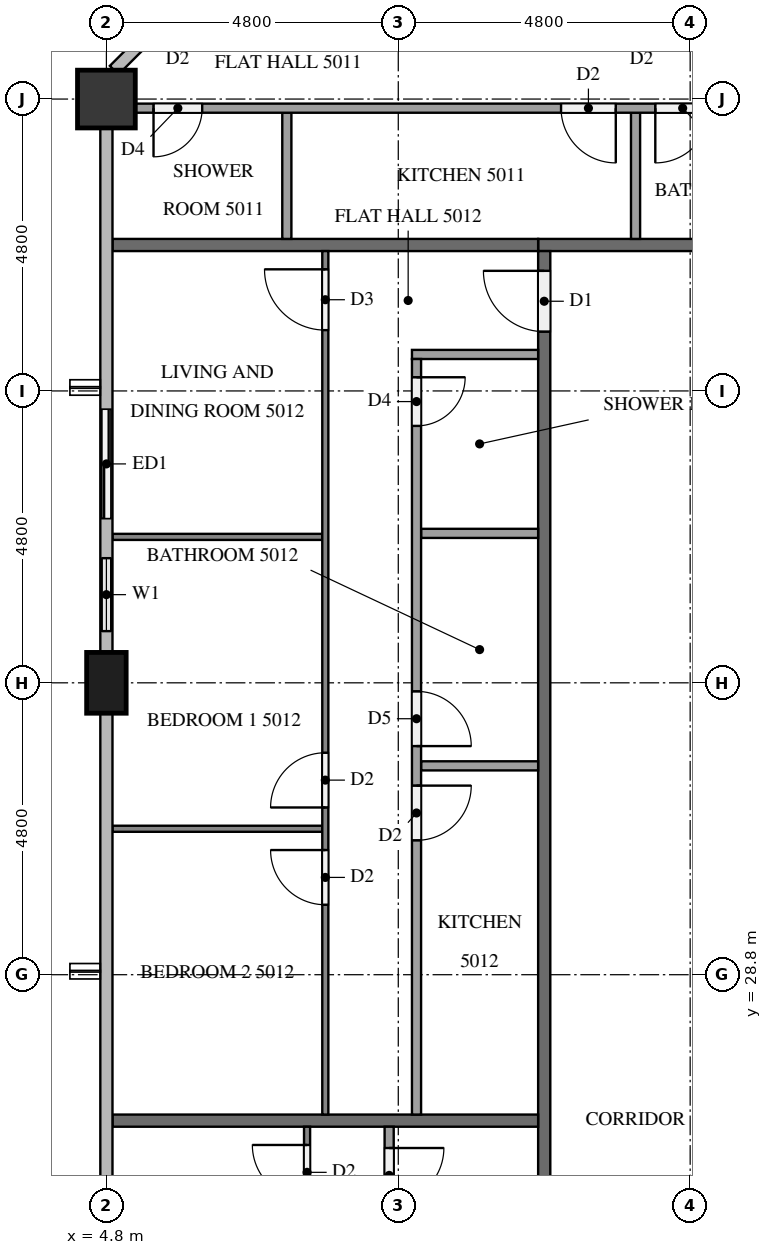
"""IFC4 building model, lengths in metres.
Left out: names, types, materials, properties, quantities, classifications, styles, units other than length and angle.
Written with IfcOpenShell. Run it as: python <this file> out.ifc"""

import sys

from ifc_helpers import new_model, si_unit, direction, frame, frame_2d, origin, origin_2d, place, context, subcontext, project, spatial, rectangle, extrude, element, fill, save


model = new_model("IFC4")
c1 = context("Model", 3, precision=1e-05, world=origin(), true_north=direction((0.0, 1.0)))
c2 = subcontext(c1, "Body", "Model", "MODEL_VIEW")
j1 = project(units=[si_unit("LENGTHUNIT", "METRE"), si_unit("PLANEANGLEUNIT", "RADIAN")], contexts=[c1])
p1 = place(None, origin())
s1 = spatial("IfcSite", under=j1, at=p1, CompositionType="ELEMENT")
p2 = place(p1, origin())
s2 = spatial("IfcBuilding", under=s1, at=p2, CompositionType="ELEMENT")
p3 = place(p2, frame((0.0, 0.0, 192.9)))
s3 = spatial("IfcBuildingStorey", under=s2, at=p3, CompositionType="ELEMENT", Elevation=192.9)
p4 = place(p3, frame((4.8, 43.2, 0.0), z_axis=(0.0, 0.0, 1.0), x_axis=(1.0, 0.0, 0.0)))
e1 = element("IfcColumn", 1, at=p4, inside=s3, PredefinedType="COLUMN", context=c2, shape_type="SweptSolid", body=[
    extrude(rectangle(XDim=0.95, YDim=0.95, at=origin_2d()), origin(), (0.0, 0.0, 1.0), 3.2),
])
p5 = place(p3, frame((4.8, 33.6, 0.0), z_axis=(0.0, 0.0, 1.0), x_axis=(0.0, 1.0, 0.0)))
e2 = element("IfcColumn", 2, at=p5, inside=s3, PredefinedType="COLUMN", context=c2, shape_type="SweptSolid", body=[
    extrude(rectangle(XDim=1.0, YDim=0.65, at=origin_2d()), origin(), (0.0, 0.0, 1.0), 3.2),
])
p6 = place(p3, frame((4.8, 38.4, 0.0), z_axis=(0.0, 0.0, 1.0), x_axis=(0.0, -1.0, 0.0)))
e3 = element("IfcWall", 3, at=p6, inside=s3, PredefinedType="SOLIDWALL", context=c2, shape_type="SweptSolid", body=[
    extrude(rectangle(XDim=4.3, YDim=0.15, at=frame_2d((2.15, 0.0))), origin(), (0.0, 0.0, 1.0), 3.2),
])
p7 = place(p6, frame((0.3, 0.0, 0.0)))
e4 = element("IfcOpeningElement", 4, at=p7, cuts=e3, PredefinedType="OPENING", context=c2, shape_type="SweptSolid", body=[
    extrude(rectangle(XDim=1.8, YDim=2.4, at=frame_2d((0.9, 1.2))), frame((0.0, 0.085, 0.0), z_axis=(0.0, -1.0, 0.0), x_axis=(1.0, 0.0, 0.0)), (0.0, 0.0, 1.0), 0.17),
])
p8 = place(p6, frame((2.75, 0.0, 0.9)))
e5 = element("IfcOpeningElement", 5, at=p8, cuts=e3, PredefinedType="OPENING", context=c2, shape_type="SweptSolid", body=[
    extrude(rectangle(XDim=1.2, YDim=1.4, at=frame_2d((0.6, 0.7))), frame((0.0, 0.085, 0.0), z_axis=(0.0, -1.0, 0.0), x_axis=(1.0, 0.0, 0.0)), (0.0, 0.0, 1.0), 0.17),
])
p9 = place(p3, frame((11.9, 40.8, 0.0), z_axis=(0.0, 0.0, 1.0), x_axis=(1.0, 0.0, 0.0)))
e6 = element("IfcWall", 6, at=p9, inside=s3, PredefinedType="PARTITIONING", context=c2, shape_type="SweptSolid", body=[
    extrude(rectangle(XDim=38.6, YDim=0.2, at=frame_2d((19.3, 0.0))), origin(), (0.0, 0.0, 1.0), 3.2),
])
p10 = place(p9, frame((34.125, 0.0, 0.0)))
e7 = element("IfcOpeningElement", 7, at=p10, cuts=e6, PredefinedType="OPENING", context=c2, shape_type="SweptSolid", body=[
    extrude(rectangle(XDim=1.0, YDim=2.1, at=frame_2d((0.5, 1.05))), frame((0.0, 0.11, 0.0), z_axis=(0.0, -1.0, 0.0), x_axis=(1.0, 0.0, 0.0)), (0.0, 0.0, 1.0), 0.22),
])
p11 = place(p9, frame((24.525, 0.0, 0.0)))
e8 = element("IfcOpeningElement", 8, at=p11, cuts=e6, PredefinedType="OPENING", context=c2, shape_type="SweptSolid", body=[
    extrude(rectangle(XDim=1.0, YDim=2.1, at=frame_2d((0.5, 1.05))), frame((0.0, 0.11, 0.0), z_axis=(0.0, -1.0, 0.0), x_axis=(1.0, 0.0, 0.0)), (0.0, 0.0, 1.0), 0.22),
])
p12 = place(p9, frame((7.725, 0.0, 0.0)))
e9 = element("IfcOpeningElement", 9, at=p12, cuts=e6, PredefinedType="OPENING", context=c2, shape_type="SweptSolid", body=[
    extrude(rectangle(XDim=1.0, YDim=2.1, at=frame_2d((0.5, 1.05))), frame((0.0, 0.11, 0.0), z_axis=(0.0, -1.0, 0.0), x_axis=(1.0, 0.0, 0.0)), (0.0, 0.0, 1.0), 0.22),
])
p13 = place(p9, frame((5.875, 0.0, 0.0)))
e10 = element("IfcOpeningElement", 10, at=p13, cuts=e6, PredefinedType="OPENING", context=c2, shape_type="SweptSolid", body=[
    extrude(rectangle(XDim=1.0, YDim=2.1, at=frame_2d((0.5, 1.05))), frame((0.0, 0.11, 0.0), z_axis=(0.0, -1.0, 0.0), x_axis=(1.0, 0.0, 0.0)), (0.0, 0.0, 1.0), 0.22),
])
p14 = place(p3, frame((12.0, 12.1, 0.0), z_axis=(0.0, 0.0, 1.0), x_axis=(0.0, 1.0, 0.0)))
e11 = element("IfcWall", 11, at=p14, inside=s3, PredefinedType="PARTITIONING", context=c2, shape_type="SweptSolid", body=[
    extrude(rectangle(XDim=28.6, YDim=0.2, at=frame_2d((14.3, 0.0))), origin(), (0.0, 0.0, 1.0), 3.2),
])
p15 = place(p14, frame((27.275, 0.0, 0.0)))
e12 = element("IfcOpeningElement", 12, at=p15, cuts=e11, PredefinedType="OPENING", context=c2, shape_type="SweptSolid", body=[
    extrude(rectangle(XDim=1.0, YDim=2.1, at=frame_2d((0.5, 1.05))), frame((0.0, 0.11, 0.0), z_axis=(0.0, -1.0, 0.0), x_axis=(1.0, 0.0, 0.0)), (0.0, 0.0, 1.0), 0.22),
])
p16 = place(p14, frame((0.325, 0.0, 0.0)))
e13 = element("IfcOpeningElement", 13, at=p16, cuts=e11, PredefinedType="OPENING", context=c2, shape_type="SweptSolid", body=[
    extrude(rectangle(XDim=1.0, YDim=2.1, at=frame_2d((0.5, 1.05))), frame((0.0, 0.11, 0.0), z_axis=(0.0, -1.0, 0.0), x_axis=(1.0, 0.0, 0.0)), (0.0, 0.0, 1.0), 0.22),
])
for number, where, z_axis, x_axis in (
    (14, (4.9, 40.8, 0.0), (0.0, 0.0, 1.0), (1.0, 0.0, 0.0)),
    (15, (4.9, 26.4, 0.0), (0.0, 0.0, 1.0), (1.0, 0.0, 0.0)),
):
    element("IfcWall", number, at=place(p3, frame(where, z_axis=z_axis, x_axis=x_axis)), inside=s3, PredefinedType="PARTITIONING", context=c2, shape_type="SweptSolid", body=[
        extrude(rectangle(XDim=7.0, YDim=0.2, at=frame_2d((3.5, 0.0))), origin(), (0.0, 0.0, 1.0), 3.2),
    ])
for number, where, z_axis, x_axis in (
    (16, (13.502, 40.9, 0.0), (0.0, 0.0, 1.0), (0.0, 1.0, 0.0)),
    (17, (7.767, 40.9, 0.0), (0.0, 0.0, 1.0), (0.0, 1.0, 0.0)),
):
    element("IfcWall", number, at=place(p3, frame(where, z_axis=z_axis, x_axis=x_axis)), inside=s3, PredefinedType="PARTITIONING", context=c2, shape_type="SweptSolid", body=[
        extrude(rectangle(XDim=2.075, YDim=0.15, at=frame_2d((1.038, 0.0))), origin(), (0.0, 0.0, 1.0), 3.2),
    ])
p17 = place(p3, frame((17.325, 43.05, 0.0), z_axis=(0.0, 0.0, 1.0), x_axis=(-1.0, 0.0, 0.0)))
e18 = element("IfcWall", 18, at=p17, inside=s3, PredefinedType="PARTITIONING", context=c2, shape_type="SweptSolid", body=[
    extrude(rectangle(XDim=12.05, YDim=0.15, at=frame_2d((6.025, 0.0))), origin(), (0.0, 0.0, 1.0), 3.2),
])
p18 = place(p17, frame((2.598, 0.0, 0.0)))
e19 = element("IfcOpeningElement", 19, at=p18, cuts=e18, PredefinedType="OPENING", context=c2, shape_type="SweptSolid", body=[
    extrude(rectangle(XDim=0.9, YDim=2.1, at=frame_2d((0.45, 1.05))), frame((0.0, 0.085, 0.0), z_axis=(0.0, -1.0, 0.0), x_axis=(1.0, 0.0, 0.0)), (0.0, 0.0, 1.0), 0.17),
])
p19 = place(p17, frame((4.148, 0.0, 0.0)))
e20 = element("IfcOpeningElement", 20, at=p19, cuts=e18, PredefinedType="OPENING", context=c2, shape_type="SweptSolid", body=[
    extrude(rectangle(XDim=0.9, YDim=2.1, at=frame_2d((0.45, 1.05))), frame((0.0, 0.085, 0.0), z_axis=(0.0, -1.0, 0.0), x_axis=(1.0, 0.0, 0.0)), (0.0, 0.0, 1.0), 0.17),
])
p20 = place(p17, frame((10.95, 0.0, 0.0)))
e21 = element("IfcOpeningElement", 21, at=p20, cuts=e18, PredefinedType="OPENING", context=c2, shape_type="SweptSolid", body=[
    extrude(rectangle(XDim=0.8, YDim=2.1, at=frame_2d((0.4, 1.05))), frame((0.0, 0.085, 0.0), z_axis=(0.0, -1.0, 0.0), x_axis=(1.0, 0.0, 0.0)), (0.0, 0.0, 1.0), 0.17),
])
for number, where, z_axis, x_axis in (
    (22, (8.35, 36.0, 0.0), (0.0, 0.0, 1.0), (-1.0, 0.0, 0.0)),
    (23, (8.35, 31.2, 0.0), (0.0, 0.0, 1.0), (-1.0, 0.0, 0.0)),
):
    element("IfcWall", number, at=place(p3, frame(where, z_axis=z_axis, x_axis=x_axis)), inside=s3, PredefinedType="PARTITIONING", context=c2, shape_type="SweptSolid", body=[
        extrude(rectangle(XDim=3.45, YDim=0.1, at=frame_2d((1.725, 0.0))), origin(), (0.0, 0.0, 1.0), 3.2),
    ])
p21 = place(p3, frame((8.4, 26.5, 0.0), z_axis=(0.0, 0.0, 1.0), x_axis=(0.0, 1.0, 0.0)))
e24 = element("IfcWall", 24, at=p21, inside=s3, PredefinedType="PARTITIONING", context=c2, shape_type="SweptSolid", body=[
    extrude(rectangle(XDim=14.2, YDim=0.1, at=frame_2d((7.1, 0.0))), origin(), (0.0, 0.0, 1.0), 3.2),
])
p22 = place(p21, frame((12.9, 0.0, 0.0)))
e25 = element("IfcOpeningElement", 25, at=p22, cuts=e24, PredefinedType="OPENING", context=c2, shape_type="SweptSolid", body=[
    extrude(rectangle(XDim=1.0, YDim=2.1, at=frame_2d((0.5, 1.05))), frame((0.0, 0.06, 0.0), z_axis=(0.0, -1.0, 0.0), x_axis=(1.0, 0.0, 0.0)), (0.0, 0.0, 1.0), 0.12),
])
p23 = place(p21, frame((5.05, 0.0, 0.0)))
e26 = element("IfcOpeningElement", 26, at=p23, cuts=e24, PredefinedType="OPENING", context=c2, shape_type="SweptSolid", body=[
    extrude(rectangle(XDim=0.9, YDim=2.1, at=frame_2d((0.45, 1.05))), frame((0.0, 0.06, 0.0), z_axis=(0.0, -1.0, 0.0), x_axis=(1.0, 0.0, 0.0)), (0.0, 0.0, 1.0), 0.12),
])
p24 = place(p21, frame((3.45, 0.0, 0.0)))
e27 = element("IfcOpeningElement", 27, at=p24, cuts=e24, PredefinedType="OPENING", context=c2, shape_type="SweptSolid", body=[
    extrude(rectangle(XDim=0.9, YDim=2.1, at=frame_2d((0.45, 1.05))), frame((0.0, 0.06, 0.0), z_axis=(0.0, -1.0, 0.0), x_axis=(1.0, 0.0, 0.0)), (0.0, 0.0, 1.0), 0.12),
])
for number, where, z_axis, x_axis in (
    (28, (11.9, 36.058, 0.0), (0.0, 0.0, 1.0), (-1.0, 0.0, 0.0)),
    (29, (11.9, 32.235, 0.0), (0.0, 0.0, 1.0), (-1.0, 0.0, 0.0)),
):
    element("IfcWall", number, at=place(p3, frame(where, z_axis=z_axis, x_axis=x_axis)), inside=s3, PredefinedType="PARTITIONING", context=c2, shape_type="SweptSolid", body=[
        extrude(rectangle(XDim=1.925, YDim=0.15, at=frame_2d((0.962, 0.0))), origin(), (0.0, 0.0, 1.0), 3.2),
    ])
p25 = place(p3, frame((11.9, 39.0, 0.0), z_axis=(0.0, 0.0, 1.0), x_axis=(-1.0, 0.0, 0.0)))
e30 = element("IfcWall", 30, at=p25, inside=s3, PredefinedType="PARTITIONING", context=c2, shape_type="SweptSolid", body=[
    extrude(rectangle(XDim=2.075, YDim=0.15, at=frame_2d((1.038, 0.0))), origin(), (0.0, 0.0, 1.0), 3.2),
])
p26 = place(p3, frame((9.9, 38.925, 0.0), z_axis=(0.0, 0.0, 1.0), x_axis=(0.0, -1.0, 0.0)))
e31 = element("IfcWall", 31, at=p26, inside=s3, PredefinedType="PARTITIONING", context=c2, shape_type="SweptSolid", body=[
    extrude(rectangle(XDim=12.425, YDim=0.15, at=frame_2d((6.212, 0.0))), origin(), (0.0, 0.0, 1.0), 3.2),
])
p27 = place(p26, frame((0.3, 0.0, 0.0)))
e32 = element("IfcOpeningElement", 32, at=p27, cuts=e31, PredefinedType="OPENING", context=c2, shape_type="SweptSolid", body=[
    extrude(rectangle(XDim=0.8, YDim=2.1, at=frame_2d((0.4, 1.05))), frame((0.0, 0.085, 0.0), z_axis=(0.0, -1.0, 0.0), x_axis=(1.0, 0.0, 0.0)), (0.0, 0.0, 1.0), 0.17),
])
p28 = place(p26, frame((5.465, 0.0, 0.0)))
e33 = element("IfcOpeningElement", 33, at=p28, cuts=e31, PredefinedType="OPENING", context=c2, shape_type="SweptSolid", body=[
    extrude(rectangle(XDim=0.9, YDim=2.1, at=frame_2d((0.45, 1.05))), frame((0.0, 0.085, 0.0), z_axis=(0.0, -1.0, 0.0), x_axis=(1.0, 0.0, 0.0)), (0.0, 0.0, 1.0), 0.17),
])
p29 = place(p26, frame((7.015, 0.0, 0.0)))
e34 = element("IfcOpeningElement", 34, at=p29, cuts=e31, PredefinedType="OPENING", context=c2, shape_type="SweptSolid", body=[
    extrude(rectangle(XDim=0.9, YDim=2.1, at=frame_2d((0.45, 1.05))), frame((0.0, 0.085, 0.0), z_axis=(0.0, -1.0, 0.0), x_axis=(1.0, 0.0, 0.0)), (0.0, 0.0, 1.0), 0.17),
])
p30 = place(p3, frame((8.1, 12.1, 0.0), z_axis=(0.0, 0.0, 1.0), x_axis=(0.0, 1.0, 0.0)))
e35 = element("IfcWall", 35, at=p30, inside=s3, PredefinedType="PARTITIONING", context=c2, shape_type="SweptSolid", body=[
    extrude(rectangle(XDim=14.2, YDim=0.1, at=frame_2d((7.1, 0.0))), origin(), (0.0, 0.0, 1.0), 3.2),
])
p31 = place(p30, frame((3.45, 0.0, 0.0)))
e36 = element("IfcOpeningElement", 36, at=p31, cuts=e35, PredefinedType="OPENING", context=c2, shape_type="SweptSolid", body=[
    extrude(rectangle(XDim=0.9, YDim=2.1, at=frame_2d((0.45, 1.05))), frame((0.0, 0.06, 0.0), z_axis=(0.0, -1.0, 0.0), x_axis=(1.0, 0.0, 0.0)), (0.0, 0.0, 1.0), 0.12),
])
p32 = place(p30, frame((5.05, 0.0, 0.0)))
e37 = element("IfcOpeningElement", 37, at=p32, cuts=e35, PredefinedType="OPENING", context=c2, shape_type="SweptSolid", body=[
    extrude(rectangle(XDim=1.0, YDim=2.1, at=frame_2d((0.5, 1.05))), frame((0.0, 0.06, 0.0), z_axis=(0.0, -1.0, 0.0), x_axis=(1.0, 0.0, 0.0)), (0.0, 0.0, 1.0), 0.12),
])
p33 = place(p30, frame((13.0, 0.0, 0.0)))
e38 = element("IfcOpeningElement", 38, at=p33, cuts=e35, PredefinedType="OPENING", context=c2, shape_type="SweptSolid", body=[
    extrude(rectangle(XDim=0.9, YDim=2.1, at=frame_2d((0.45, 1.05))), frame((0.0, 0.06, 0.0), z_axis=(0.0, -1.0, 0.0), x_axis=(1.0, 0.0, 0.0)), (0.0, 0.0, 1.0), 0.12),
])
p34 = place(p3, frame((9.45, 26.3, 0.0), z_axis=(0.0, 0.0, 1.0), x_axis=(0.0, -1.0, 0.0)))
e39 = element("IfcWall", 39, at=p34, inside=s3, PredefinedType="PARTITIONING", context=c2, shape_type="SweptSolid", body=[
    extrude(rectangle(XDim=12.425, YDim=0.15, at=frame_2d((6.212, 0.0))), origin(), (0.0, 0.0, 1.0), 3.2),
])
p35 = place(p34, frame((9.883, 0.0, 0.0)))
e40 = element("IfcOpeningElement", 40, at=p35, cuts=e39, PredefinedType="OPENING", context=c2, shape_type="SweptSolid", body=[
    extrude(rectangle(XDim=0.8, YDim=2.1, at=frame_2d((0.4, 1.05))), frame((0.0, 0.085, 0.0), z_axis=(0.0, -1.0, 0.0), x_axis=(1.0, 0.0, 0.0)), (0.0, 0.0, 1.0), 0.17),
])
p36 = place(p34, frame((8.333, 0.0, 0.0)))
e41 = element("IfcOpeningElement", 41, at=p36, cuts=e39, PredefinedType="OPENING", context=c2, shape_type="SweptSolid", body=[
    extrude(rectangle(XDim=0.9, YDim=2.1, at=frame_2d((0.45, 1.05))), frame((0.0, 0.085, 0.0), z_axis=(0.0, -1.0, 0.0), x_axis=(1.0, 0.0, 0.0)), (0.0, 0.0, 1.0), 0.17),
])
p37 = place(p34, frame((0.35, 0.0, 0.0)))
e42 = element("IfcOpeningElement", 42, at=p37, cuts=e39, PredefinedType="OPENING", context=c2, shape_type="SweptSolid", body=[
    extrude(rectangle(XDim=0.9, YDim=2.1, at=frame_2d((0.45, 1.05))), frame((0.0, 0.085, 0.0), z_axis=(0.0, -1.0, 0.0), x_axis=(1.0, 0.0, 0.0)), (0.0, 0.0, 1.0), 0.17),
])
p38 = place(p7, origin())
e43 = element("IfcDoor", 43, at=p38, inside=s3, OperationType="SLIDING_TO_RIGHT", PredefinedType="DOOR", context=c2, shape_type="SweptSolid", body=[
    extrude(rectangle(XDim=1.8, YDim=2.4, at=frame_2d((0.9, 1.2))), frame((0.0, 0.025, 0.0), z_axis=(0.0, -1.0, 0.0), x_axis=(1.0, 0.0, 0.0)), (0.0, 0.0, 1.0), 0.05),
])
fill(e4, e43)
p39 = place(p8, origin())
e44 = element("IfcWindow", 44, at=p39, inside=s3, PartitioningType="SINGLE_PANEL", PredefinedType="WINDOW", context=c2, shape_type="SweptSolid", body=[
    extrude(rectangle(XDim=1.2, YDim=1.4, at=frame_2d((0.6, 0.7))), frame((0.0, 0.03, 0.0), z_axis=(0.0, -1.0, 0.0), x_axis=(1.0, 0.0, 0.0)), (0.0, 0.0, 1.0), 0.06),
])
fill(e5, e44)
p40 = place(p15, origin())
e45 = element("IfcDoor", 45, at=p40, inside=s3, OperationType="SINGLE_SWING_RIGHT", PredefinedType="DOOR", context=c2, shape_type="SweptSolid", body=[
    extrude(rectangle(XDim=1.0, YDim=2.1, at=frame_2d((0.5, 1.05))), frame((0.0, 0.025, 0.0), z_axis=(0.0, -1.0, 0.0), x_axis=(1.0, 0.0, 0.0)), (0.0, 0.0, 1.0), 0.05),
])
fill(e12, e45)
p41 = place(p18, origin())
e46 = element("IfcDoor", 46, at=p41, inside=s3, OperationType="SINGLE_SWING_RIGHT", PredefinedType="DOOR", context=c2, shape_type="SweptSolid", body=[
    extrude(rectangle(XDim=0.9, YDim=2.1, at=frame_2d((0.45, 1.05))), frame((0.0, 0.025, 0.0), z_axis=(0.0, -1.0, 0.0), x_axis=(1.0, 0.0, 0.0)), (0.0, 0.0, 1.0), 0.05),
])
fill(e19, e46)
p42 = place(p19, origin())
e47 = element("IfcDoor", 47, at=p42, inside=s3, OperationType="SINGLE_SWING_LEFT", PredefinedType="DOOR", context=c2, shape_type="SweptSolid", body=[
    extrude(rectangle(XDim=0.9, YDim=2.1, at=frame_2d((0.45, 1.05))), frame((0.0, 0.025, 0.0), z_axis=(0.0, -1.0, 0.0), x_axis=(1.0, 0.0, 0.0)), (0.0, 0.0, 1.0), 0.05),
])
fill(e20, e47)
p43 = place(p20, origin())
e48 = element("IfcDoor", 48, at=p43, inside=s3, OperationType="SINGLE_SWING_RIGHT", PredefinedType="DOOR", context=c2, shape_type="SweptSolid", body=[
    extrude(rectangle(XDim=0.8, YDim=2.1, at=frame_2d((0.4, 1.05))), frame((0.0, 0.025, 0.0), z_axis=(0.0, -1.0, 0.0), x_axis=(1.0, 0.0, 0.0)), (0.0, 0.0, 1.0), 0.05),
])
fill(e21, e48)
p44 = place(p22, origin())
e49 = element("IfcDoor", 49, at=p44, inside=s3, OperationType="SINGLE_SWING_RIGHT", PredefinedType="DOOR", context=c2, shape_type="SweptSolid", body=[
    extrude(rectangle(XDim=1.0, YDim=2.1, at=frame_2d((0.5, 1.05))), frame((0.0, 0.025, 0.0), z_axis=(0.0, -1.0, 0.0), x_axis=(1.0, 0.0, 0.0)), (0.0, 0.0, 1.0), 0.05),
])
fill(e25, e49)
p45 = place(p23, origin())
e50 = element("IfcDoor", 50, at=p45, inside=s3, OperationType="SINGLE_SWING_LEFT", PredefinedType="DOOR", context=c2, shape_type="SweptSolid", body=[
    extrude(rectangle(XDim=0.9, YDim=2.1, at=frame_2d((0.45, 1.05))), frame((0.0, 0.025, 0.0), z_axis=(0.0, -1.0, 0.0), x_axis=(1.0, 0.0, 0.0)), (0.0, 0.0, 1.0), 0.05),
])
fill(e26, e50)
p46 = place(p24, origin())
e51 = element("IfcDoor", 51, at=p46, inside=s3, OperationType="SINGLE_SWING_RIGHT", PredefinedType="DOOR", context=c2, shape_type="SweptSolid", body=[
    extrude(rectangle(XDim=0.9, YDim=2.1, at=frame_2d((0.45, 1.05))), frame((0.0, 0.025, 0.0), z_axis=(0.0, -1.0, 0.0), x_axis=(1.0, 0.0, 0.0)), (0.0, 0.0, 1.0), 0.05),
])
fill(e27, e51)
p47 = place(p27, origin())
e52 = element("IfcDoor", 52, at=p47, inside=s3, OperationType="SINGLE_SWING_LEFT", PredefinedType="DOOR", context=c2, shape_type="SweptSolid", body=[
    extrude(rectangle(XDim=0.8, YDim=2.1, at=frame_2d((0.4, 1.05))), frame((0.0, 0.025, 0.0), z_axis=(0.0, -1.0, 0.0), x_axis=(1.0, 0.0, 0.0)), (0.0, 0.0, 1.0), 0.05),
])
fill(e32, e52)
p48 = place(p28, origin())
e53 = element("IfcDoor", 53, at=p48, inside=s3, OperationType="SINGLE_SWING_RIGHT", PredefinedType="DOOR", context=c2, shape_type="SweptSolid", body=[
    extrude(rectangle(XDim=0.9, YDim=2.1, at=frame_2d((0.45, 1.05))), frame((0.0, 0.025, 0.0), z_axis=(0.0, -1.0, 0.0), x_axis=(1.0, 0.0, 0.0)), (0.0, 0.0, 1.0), 0.05),
])
fill(e33, e53)
p49 = place(p29, origin())
e54 = element("IfcDoor", 54, at=p49, inside=s3, OperationType="SINGLE_SWING_LEFT", PredefinedType="DOOR", context=c2, shape_type="SweptSolid", body=[
    extrude(rectangle(XDim=0.9, YDim=2.1, at=frame_2d((0.45, 1.05))), frame((0.0, 0.025, 0.0), z_axis=(0.0, -1.0, 0.0), x_axis=(1.0, 0.0, 0.0)), (0.0, 0.0, 1.0), 0.05),
])
fill(e34, e54)
p50 = place(p33, origin())
e55 = element("IfcDoor", 55, at=p50, inside=s3, OperationType="SINGLE_SWING_RIGHT", PredefinedType="DOOR", context=c2, shape_type="SweptSolid", body=[
    extrude(rectangle(XDim=0.9, YDim=2.1, at=frame_2d((0.45, 1.05))), frame((0.0, 0.025, 0.0), z_axis=(0.0, -1.0, 0.0), x_axis=(1.0, 0.0, 0.0)), (0.0, 0.0, 1.0), 0.05),
])
fill(e38, e55)
p51 = place(p37, origin())
e56 = element("IfcDoor", 56, at=p51, inside=s3, OperationType="SINGLE_SWING_LEFT", PredefinedType="DOOR", context=c2, shape_type="SweptSolid", body=[
    extrude(rectangle(XDim=0.9, YDim=2.1, at=frame_2d((0.45, 1.05))), frame((0.0, 0.025, 0.0), z_axis=(0.0, -1.0, 0.0), x_axis=(1.0, 0.0, 0.0)), (0.0, 0.0, 1.0), 0.05),
])
fill(e42, e56)
save(model, sys.argv[1])
